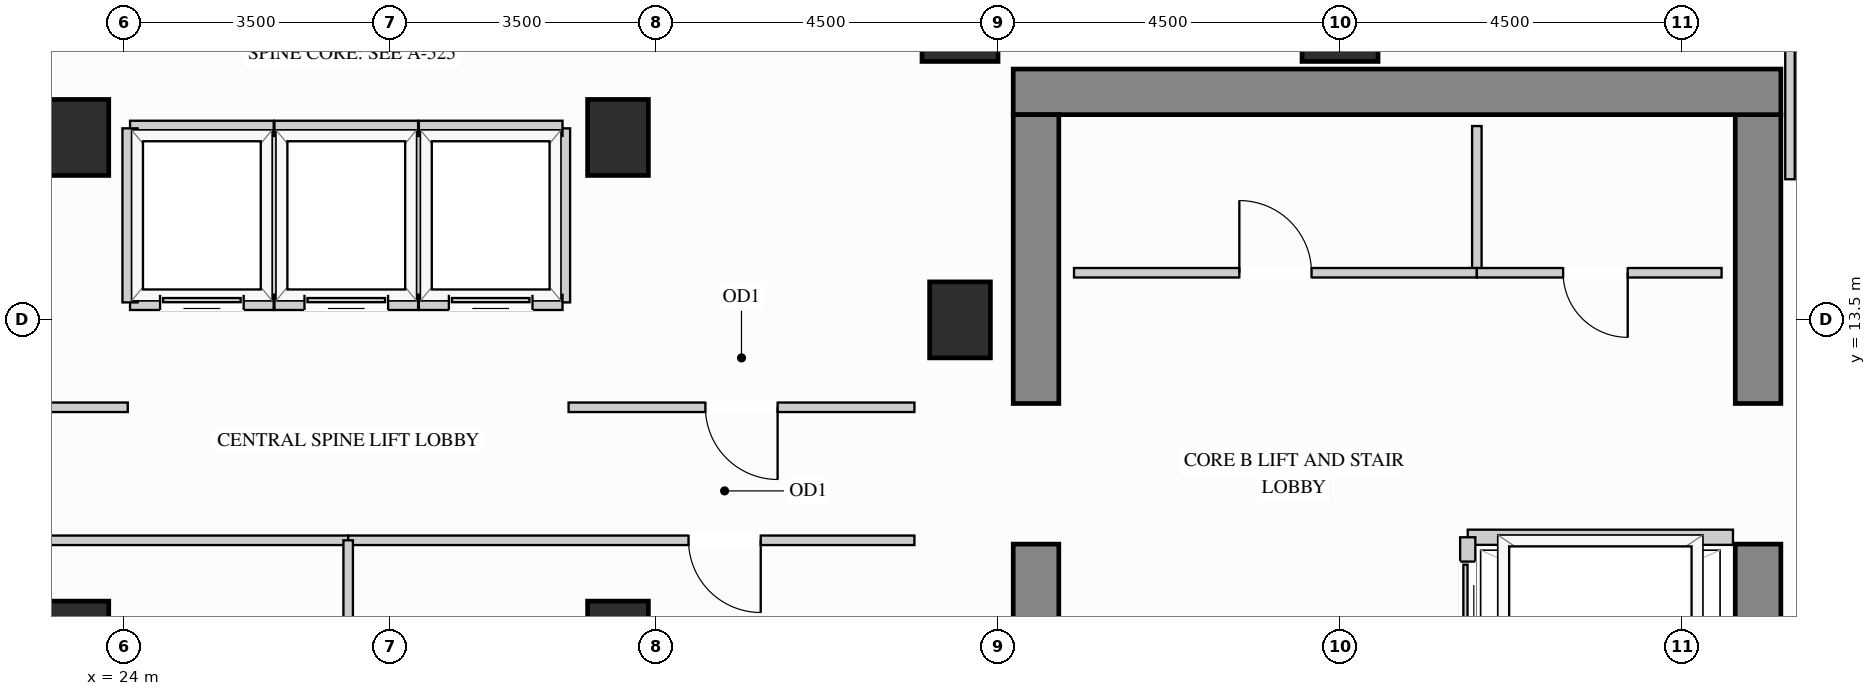
"""IFC4 building model, lengths in metres.
Left out: names, types, materials, properties, quantities, classifications, styles, units other than length and angle.
Written with IfcOpenShell. Run it as: python <this file> out.ifc"""

import sys

from ifc_helpers import new_model, si_unit, direction, frame, frame_2d, origin, origin_2d, place, context, subcontext, project, spatial, rectangle, extrude, source, transform, mapped, element, fill, save


model = new_model("IFC4")
c1 = context("Model", 3, precision=1e-05, world=origin(), true_north=direction((0.0, 1.0)))
c2 = subcontext(c1, "Body", "Model", "MODEL_VIEW")
j1 = project(units=[si_unit("LENGTHUNIT", "METRE"), si_unit("PLANEANGLEUNIT", "RADIAN")], contexts=[c1])
p1 = place(None, origin())
s1 = spatial("IfcSite", under=j1, at=p1, CompositionType="ELEMENT")
p2 = place(p1, origin())
s2 = spatial("IfcBuilding", under=s1, at=p2, CompositionType="ELEMENT")
p3 = place(p2, frame((0.0, 0.0, 197.1)))
s3 = spatial("IfcBuildingStorey", under=s2, at=p3, CompositionType="ELEMENT", Elevation=197.1)
m1 = source(origin(), c2, "Body", "SweptSolid", [
    extrude(rectangle(XDim=0.8, YDim=1.0, at=origin_2d()), origin(), (0.0, 0.0, 1.0), 3.4),
])
for number, where, z_axis, x_axis in (
    (1, (35.0, 13.5, 0.0), (0.0, 0.0, 1.0), (1.0, 0.0, 0.0)),
    (2, (23.4, 15.9, 0.0), (0.0, 0.0, 1.0), (1.0, 0.0, 0.0)),
    (3, (23.4, 9.3, 0.0), (0.0, 0.0, 1.0), (1.0, 0.0, 0.0)),
    (4, (30.5, 15.9, 0.0), (0.0, 0.0, 1.0), (1.0, 0.0, 0.0)),
    (5, (30.5, 9.3, 0.0), (0.0, 0.0, 1.0), (1.0, 0.0, 0.0)),
):
    element("IfcColumn", number, at=place(p3, frame(where, z_axis=z_axis, x_axis=x_axis)), inside=s3, PredefinedType="COLUMN", context=c2, shape_type="MappedRepresentation", body=[
        mapped(m1, transform((0.0, 0.0, 0.0), x_axis=(1.0, 0.0, 0.0), y_axis=(0.0, 1.0, 0.0), z_axis=(0.0, 0.0, 1.0))),
    ])
m2 = source(origin(), c2, "Body", "SweptSolid", [
    extrude(rectangle(XDim=1.0, YDim=1.0, at=origin_2d()), origin(), (0.0, 0.0, 1.0), 3.4),
])
for number, where, z_axis, x_axis in (
    (6, (35.0, 17.4, 0.0), (0.0, 0.0, 1.0), (1.0, 0.0, 0.0)),
    (7, (40.0, 17.4, 0.0), (0.0, 0.0, 1.0), (1.0, 0.0, 0.0)),
):
    element("IfcColumn", number, at=place(p3, frame(where, z_axis=z_axis, x_axis=x_axis)), inside=s3, PredefinedType="COLUMN", context=c2, shape_type="MappedRepresentation", body=[
        mapped(m2, transform((0.0, 0.0, 0.0), x_axis=(1.0, 0.0, 0.0), y_axis=(0.0, 1.0, 0.0), z_axis=(0.0, 0.0, 1.0))),
    ])
m3 = source(origin(), c2, "Body", "SweptSolid", [
    extrude(rectangle(XDim=5.75, YDim=0.6, at=frame_2d((2.875, 0.0))), origin(), (0.0, 0.0, 1.0), 3.4),
])
p4 = place(p3, frame((45.5, 4.8, 0.0), z_axis=(0.0, 0.0, 1.0), x_axis=(0.0, 1.0, 0.0)))
e8 = element("IfcWall", 8, at=p4, inside=s3, PredefinedType="SHEAR", context=c2, shape_type="MappedRepresentation", body=[
    mapped(m3, transform((0.0, 0.0, 0.0), x_axis=(1.0, 0.0, 0.0), y_axis=(0.0, 1.0, 0.0), z_axis=(0.0, 0.0, 1.0))),
])
m4 = source(origin(), c2, "Body", "SweptSolid", [
    extrude(rectangle(XDim=3.8, YDim=0.6, at=frame_2d((1.9, 0.0))), origin(), (0.0, 0.0, 1.0), 3.4),
])
p5 = place(p3, frame((45.5, 12.4, 0.0), z_axis=(0.0, 0.0, 1.0), x_axis=(0.0, 1.0, 0.0)))
e9 = element("IfcWall", 9, at=p5, inside=s3, PredefinedType="SHEAR", context=c2, shape_type="MappedRepresentation", body=[
    mapped(m4, transform((0.0, 0.0, 0.0), x_axis=(1.0, 0.0, 0.0), y_axis=(0.0, 1.0, 0.0), z_axis=(0.0, 0.0, 1.0))),
])
m5 = source(origin(), c2, "Body", "SweptSolid", [
    extrude(rectangle(XDim=10.1, YDim=0.6, at=frame_2d((5.05, 0.0))), origin(), (0.0, 0.0, 1.0), 3.4),
])
p6 = place(p3, frame((35.7, 16.5, 0.0), z_axis=(0.0, 0.0, 1.0), x_axis=(1.0, 0.0, 0.0)))
e10 = element("IfcWall", 10, at=p6, inside=s3, PredefinedType="SHEAR", context=c2, shape_type="MappedRepresentation", body=[
    mapped(m5, transform((0.0, 0.0, 0.0), x_axis=(1.0, 0.0, 0.0), y_axis=(0.0, 1.0, 0.0), z_axis=(0.0, 0.0, 1.0))),
])
p7 = place(p3, frame((36.0, 4.8, 0.0), z_axis=(0.0, 0.0, 1.0), x_axis=(0.0, 1.0, 0.0)))
e11 = element("IfcWall", 11, at=p7, inside=s3, PredefinedType="SHEAR", context=c2, shape_type="MappedRepresentation", body=[
    mapped(m3, transform((0.0, 0.0, 0.0), x_axis=(1.0, 0.0, 0.0), y_axis=(0.0, 1.0, 0.0), z_axis=(0.0, 0.0, 1.0))),
])
p8 = place(p3, frame((36.0, 12.4, 0.0), z_axis=(0.0, 0.0, 1.0), x_axis=(0.0, 1.0, 0.0)))
e12 = element("IfcWall", 12, at=p8, inside=s3, PredefinedType="SHEAR", context=c2, shape_type="MappedRepresentation", body=[
    mapped(m4, transform((0.0, 0.0, 0.0), x_axis=(1.0, 0.0, 0.0), y_axis=(0.0, 1.0, 0.0), z_axis=(0.0, 0.0, 1.0))),
])
m6 = source(origin(), c2, "Body", "SweptSolid", [
    extrude(rectangle(XDim=1.93, YDim=0.125, at=frame_2d((0.965, 0.0))), origin(), (0.0, 0.0, 1.0), 3.385),
])
p9 = place(p3, frame((41.8, 14.12, 0.0), z_axis=(0.0, 0.0, 1.0), x_axis=(0.0, 1.0, 0.0)))
e13 = element("IfcWall", 13, at=p9, inside=s3, PredefinedType="PARTITIONING", context=c2, shape_type="MappedRepresentation", body=[
    mapped(m6, transform((0.0, 0.0, 0.0), x_axis=(1.0, 0.0, 0.0), y_axis=(0.0, 1.0, 0.0), z_axis=(0.0, 0.0, 1.0))),
])
p10 = place(p3, frame((36.5, 14.12, 0.0), z_axis=(0.0, 0.0, 1.0), x_axis=(1.0, 0.0, 0.0)))
e14 = element("IfcWall", 14, at=p10, inside=s3, PredefinedType="PARTITIONING", context=c2, shape_type="SweptSolid", body=[
    extrude(rectangle(XDim=5.3, YDim=0.125, at=frame_2d((2.65, 0.0))), origin(), (0.0, 0.0, 1.0), 3.385),
])
p11 = place(p10, frame((2.175, 0.0, 0.0)))
e15 = element("IfcOpeningElement", 15, at=p11, cuts=e14, PredefinedType="OPENING", context=c2, shape_type="SweptSolid", body=[
    extrude(rectangle(XDim=0.95, YDim=2.15, at=frame_2d((0.475, 1.075))), frame((0.0, 0.073, 0.0), z_axis=(0.0, -1.0, 0.0), x_axis=(1.0, 0.0, 0.0)), (0.0, 0.0, 1.0), 0.145),
])
p12 = place(p3, frame((41.8, 14.12, 0.0), z_axis=(0.0, 0.0, 1.0), x_axis=(1.0, 0.0, 0.0)))
e16 = element("IfcWall", 16, at=p12, inside=s3, PredefinedType="PARTITIONING", context=c2, shape_type="SweptSolid", body=[
    extrude(rectangle(XDim=3.22, YDim=0.125, at=frame_2d((1.61, 0.0))), origin(), (0.0, 0.0, 1.0), 3.385),
])
p13 = place(p12, frame((1.135, 0.0, 0.0)))
e17 = element("IfcOpeningElement", 17, at=p13, cuts=e16, PredefinedType="OPENING", context=c2, shape_type="SweptSolid", body=[
    extrude(rectangle(XDim=0.85, YDim=2.1, at=frame_2d((0.425, 1.05))), frame((0.0, 0.073, 0.0), z_axis=(0.0, -1.0, 0.0), x_axis=(1.0, 0.0, 0.0)), (0.0, 0.0, 1.0), 0.145),
])
m7 = source(origin(), c2, "Body", "SweptSolid", [
    extrude(rectangle(XDim=2.298, YDim=0.125, at=frame_2d((1.149, 0.0))), origin(), (0.0, 0.0, 1.0), 3.385),
])
p14 = place(p3, frame((45.92, 15.35, 0.0), z_axis=(0.0, 0.0, 1.0), x_axis=(0.0, 1.0, 0.0)))
e18 = element("IfcWall", 18, at=p14, inside=s3, PredefinedType="PARTITIONING", context=c2, shape_type="MappedRepresentation", body=[
    mapped(m7, transform((0.0, 0.0, 0.0), x_axis=(1.0, 0.0, 0.0), y_axis=(0.0, 1.0, 0.0), z_axis=(0.0, 0.0, 1.0))),
])
p15 = place(p3, frame((29.85, 12.35, 0.0), z_axis=(0.0, 0.0, 1.0), x_axis=(1.0, 0.0, 0.0)))
e19 = element("IfcWall", 19, at=p15, inside=s3, PredefinedType="PARTITIONING", context=c2, shape_type="SweptSolid", body=[
    extrude(rectangle(XDim=4.55, YDim=0.125, at=frame_2d((2.275, 0.0))), origin(), (0.0, 0.0, 1.0), 3.385),
])
p16 = place(p15, frame((1.8, 0.0, 0.0)))
e20 = element("IfcOpeningElement", 20, at=p16, cuts=e19, PredefinedType="OPENING", context=c2, shape_type="SweptSolid", body=[
    extrude(rectangle(XDim=0.95, YDim=2.15, at=frame_2d((0.475, 1.075))), frame((0.0, 0.073, 0.0), z_axis=(0.0, -1.0, 0.0), x_axis=(1.0, 0.0, 0.0)), (0.0, 0.0, 1.0), 0.145),
])
p17 = place(p3, frame((19.5, 12.35, 0.0), z_axis=(0.0, 0.0, 1.0), x_axis=(1.0, 0.0, 0.0)))
e21 = element("IfcWall", 21, at=p17, inside=s3, PredefinedType="PARTITIONING", context=c2, shape_type="SweptSolid", body=[
    extrude(rectangle(XDim=4.55, YDim=0.125, at=frame_2d((2.275, 0.0))), origin(), (0.0, 0.0, 1.0), 3.385),
])
p18 = place(p17, frame((1.8, 0.0, 0.0)))
e22 = element("IfcOpeningElement", 22, at=p18, cuts=e21, PredefinedType="OPENING", context=c2, shape_type="SweptSolid", body=[
    extrude(rectangle(XDim=0.95, YDim=2.15, at=frame_2d((0.475, 1.075))), frame((0.0, 0.073, 0.0), z_axis=(0.0, -1.0, 0.0), x_axis=(1.0, 0.0, 0.0)), (0.0, 0.0, 1.0), 0.145),
])
p19 = place(p3, frame((19.5, 10.6, 0.0), z_axis=(0.0, 0.0, 1.0), x_axis=(1.0, 0.0, 0.0)))
e23 = element("IfcWall", 23, at=p19, inside=s3, PredefinedType="PARTITIONING", context=c2, shape_type="SweptSolid", body=[
    extrude(rectangle(XDim=7.45, YDim=0.125, at=frame_2d((3.725, 0.0))), origin(), (0.0, 0.0, 1.0), 3.385),
])
p20 = place(p19, frame((2.022, 0.0, 0.0)))
e24 = element("IfcOpeningElement", 24, at=p20, cuts=e23, PredefinedType="OPENING", context=c2, shape_type="SweptSolid", body=[
    extrude(rectangle(XDim=0.95, YDim=2.15, at=frame_2d((0.475, 1.075))), frame((0.0, 0.073, 0.0), z_axis=(0.0, -1.0, 0.0), x_axis=(1.0, 0.0, 0.0)), (0.0, 0.0, 1.0), 0.145),
])
p21 = place(p3, frame((26.95, 10.6, 0.0), z_axis=(0.0, 0.0, 1.0), x_axis=(1.0, 0.0, 0.0)))
e25 = element("IfcWall", 25, at=p21, inside=s3, PredefinedType="PARTITIONING", context=c2, shape_type="SweptSolid", body=[
    extrude(rectangle(XDim=7.45, YDim=0.125, at=frame_2d((3.725, 0.0))), origin(), (0.0, 0.0, 1.0), 3.385),
])
p22 = place(p21, frame((4.478, 0.0, 0.0)))
e26 = element("IfcOpeningElement", 26, at=p22, cuts=e25, PredefinedType="OPENING", context=c2, shape_type="SweptSolid", body=[
    extrude(rectangle(XDim=0.95, YDim=2.15, at=frame_2d((0.475, 1.075))), frame((0.0, 0.073, 0.0), z_axis=(0.0, -1.0, 0.0), x_axis=(1.0, 0.0, 0.0)), (0.0, 0.0, 1.0), 0.145),
])
m8 = source(origin(), c2, "Body", "SweptSolid", [
    extrude(rectangle(XDim=1.748, YDim=0.125, at=frame_2d((0.874, 0.0))), origin(), (0.0, 0.0, 1.0), 3.385),
])
p23 = place(p3, frame((26.95, 8.852, 0.0), z_axis=(0.0, 0.0, 1.0), x_axis=(0.0, 1.0, 0.0)))
e27 = element("IfcWall", 27, at=p23, inside=s3, PredefinedType="PARTITIONING", context=c2, shape_type="MappedRepresentation", body=[
    mapped(m8, transform((0.0, 0.0, 0.0), x_axis=(1.0, 0.0, 0.0), y_axis=(0.0, 1.0, 0.0), z_axis=(0.0, 0.0, 1.0))),
])
m9 = source(origin(), c2, "Body", "SweptSolid", [
    extrude(rectangle(XDim=2.29, YDim=0.2, at=frame_2d((1.145, 0.0))), origin(), (0.0, 0.0, 1.0), 3.385),
])
p24 = place(p3, frame((25.97, 13.73, 0.0), z_axis=(0.0, 0.0, 1.0), x_axis=(0.0, 1.0, 0.0)))
e28 = element("IfcWall", 28, at=p24, inside=s3, PredefinedType="PARTITIONING", context=c2, shape_type="MappedRepresentation", body=[
    mapped(m9, transform((0.0, 0.0, 0.0), x_axis=(1.0, 0.0, 0.0), y_axis=(0.0, 1.0, 0.0), z_axis=(0.0, 0.0, 1.0))),
])
m10 = source(origin(), c2, "Body", "SweptSolid", [
    extrude(rectangle(XDim=1.89, YDim=0.2, at=frame_2d((0.945, 0.0))), origin(), (0.0, 0.0, 1.0), 2.773),
])
p25 = place(p3, frame((24.08, 16.02, 0.0), z_axis=(0.0, 0.0, 1.0), x_axis=(1.0, 0.0, 0.0)))
e29 = element("IfcWall", 29, at=p25, inside=s3, PredefinedType="PARTITIONING", context=c2, shape_type="MappedRepresentation", body=[
    mapped(m10, transform((0.0, 0.0, 0.0), x_axis=(1.0, 0.0, 0.0), y_axis=(0.0, 1.0, 0.0), z_axis=(0.0, 0.0, 1.0))),
])
p26 = place(p3, frame((24.08, 13.73, 0.0), z_axis=(0.0, 0.0, 1.0), x_axis=(1.0, 0.0, 0.0)))
e30 = element("IfcWall", 30, at=p26, inside=s3, PredefinedType="PARTITIONING", context=c2, shape_type="SweptSolid", body=[
    extrude(rectangle(XDim=1.89, YDim=0.2, at=frame_2d((0.945, 0.0))), origin(), (0.0, 0.0, 1.0), 2.466),
])
p27 = place(p26, frame((0.395, 0.0, 0.0)))
e31 = element("IfcOpeningElement", 31, at=p27, cuts=e30, PredefinedType="OPENING", context=c2, shape_type="SweptSolid", body=[
    extrude(rectangle(XDim=1.1, YDim=2.2, at=frame_2d((0.55, 1.1))), frame((0.0, 0.11, 0.0), z_axis=(0.0, -1.0, 0.0), x_axis=(1.0, 0.0, 0.0)), (0.0, 0.0, 1.0), 0.22),
])
for number, where, z_axis, x_axis in (
    (32, (24.08, 13.73, 0.0), (0.0, 0.0, 1.0), (0.0, 1.0, 0.0)),
    (33, (27.87, 13.73, 0.0), (0.0, 0.0, 1.0), (0.0, 1.0, 0.0)),
):
    element("IfcWall", number, at=place(p3, frame(where, z_axis=z_axis, x_axis=x_axis)), inside=s3, PredefinedType="PARTITIONING", context=c2, shape_type="MappedRepresentation", body=[
        mapped(m9, transform((0.0, 0.0, 0.0), x_axis=(1.0, 0.0, 0.0), y_axis=(0.0, 1.0, 0.0), z_axis=(0.0, 0.0, 1.0))),
    ])
m11 = source(origin(), c2, "Body", "SweptSolid", [
    extrude(rectangle(XDim=1.89, YDim=0.2, at=frame_2d((0.945, 0.0))), origin(), (0.0, 0.0, 1.0), 2.773),
])
p28 = place(p3, frame((25.98, 16.02, 0.0), z_axis=(0.0, 0.0, 1.0), x_axis=(1.0, 0.0, 0.0)))
e34 = element("IfcWall", 34, at=p28, inside=s3, PredefinedType="PARTITIONING", context=c2, shape_type="MappedRepresentation", body=[
    mapped(m11, transform((0.0, 0.0, 0.0), x_axis=(1.0, 0.0, 0.0), y_axis=(0.0, 1.0, 0.0), z_axis=(0.0, 0.0, 1.0))),
])
p29 = place(p3, frame((25.98, 13.73, 0.0), z_axis=(0.0, 0.0, 1.0), x_axis=(1.0, 0.0, 0.0)))
e35 = element("IfcWall", 35, at=p29, inside=s3, PredefinedType="PARTITIONING", context=c2, shape_type="SweptSolid", body=[
    extrude(rectangle(XDim=1.89, YDim=0.2, at=frame_2d((0.945, 0.0))), origin(), (0.0, 0.0, 1.0), 2.466),
])
p30 = place(p29, frame((0.395, 0.0, 0.0)))
e36 = element("IfcOpeningElement", 36, at=p30, cuts=e35, PredefinedType="OPENING", context=c2, shape_type="SweptSolid", body=[
    extrude(rectangle(XDim=1.1, YDim=2.2, at=frame_2d((0.55, 1.1))), frame((0.0, 0.11, 0.0), z_axis=(0.0, -1.0, 0.0), x_axis=(1.0, 0.0, 0.0)), (0.0, 0.0, 1.0), 0.22),
])
p31 = place(p3, frame((29.77, 13.73, 0.0), z_axis=(0.0, 0.0, 1.0), x_axis=(0.0, 1.0, 0.0)))
e37 = element("IfcWall", 37, at=p31, inside=s3, PredefinedType="PARTITIONING", context=c2, shape_type="MappedRepresentation", body=[
    mapped(m9, transform((0.0, 0.0, 0.0), x_axis=(1.0, 0.0, 0.0), y_axis=(0.0, 1.0, 0.0), z_axis=(0.0, 0.0, 1.0))),
])
p32 = place(p3, frame((27.88, 16.02, 0.0), z_axis=(0.0, 0.0, 1.0), x_axis=(1.0, 0.0, 0.0)))
e38 = element("IfcWall", 38, at=p32, inside=s3, PredefinedType="PARTITIONING", context=c2, shape_type="MappedRepresentation", body=[
    mapped(m11, transform((0.0, 0.0, 0.0), x_axis=(1.0, 0.0, 0.0), y_axis=(0.0, 1.0, 0.0), z_axis=(0.0, 0.0, 1.0))),
])
p33 = place(p3, frame((27.88, 13.73, 0.0), z_axis=(0.0, 0.0, 1.0), x_axis=(1.0, 0.0, 0.0)))
e39 = element("IfcWall", 39, at=p33, inside=s3, PredefinedType="PARTITIONING", context=c2, shape_type="SweptSolid", body=[
    extrude(rectangle(XDim=1.89, YDim=0.2, at=frame_2d((0.945, 0.0))), origin(), (0.0, 0.0, 1.0), 2.466),
])
p34 = place(p33, frame((0.395, 0.0, 0.0)))
e40 = element("IfcOpeningElement", 40, at=p34, cuts=e39, PredefinedType="OPENING", context=c2, shape_type="SweptSolid", body=[
    extrude(rectangle(XDim=1.1, YDim=2.2, at=frame_2d((0.55, 1.1))), frame((0.0, 0.11, 0.0), z_axis=(0.0, -1.0, 0.0), x_axis=(1.0, 0.0, 0.0)), (0.0, 0.0, 1.0), 0.22),
])
m12 = source(origin(), c2, "Body", "SweptSolid", [
    extrude(rectangle(XDim=3.49, YDim=0.2, at=frame_2d((1.745, 0.0))), origin(), (0.0, 0.0, 1.0), 3.385),
])
p35 = place(p3, frame((41.68, 10.64, 0.0), z_axis=(0.0, 0.0, 1.0), x_axis=(1.0, 0.0, 0.0)))
e41 = element("IfcWall", 41, at=p35, inside=s3, PredefinedType="PARTITIONING", context=c2, shape_type="MappedRepresentation", body=[
    mapped(m12, transform((0.0, 0.0, 0.0), x_axis=(1.0, 0.0, 0.0), y_axis=(0.0, 1.0, 0.0), z_axis=(0.0, 0.0, 1.0))),
])
p36 = place(p3, frame((41.68, 8.9, 0.0), z_axis=(0.0, 0.0, 1.0), x_axis=(0.0, 1.0, 0.0)))
e42 = element("IfcWall", 42, at=p36, inside=s3, PredefinedType="PARTITIONING", context=c2, shape_type="SweptSolid", body=[
    extrude(rectangle(XDim=1.74, YDim=0.2, at=frame_2d((0.87, 0.0))), origin(), (0.0, 0.0, 1.0), 3.385),
])
p37 = place(p36, frame((0.32, 0.0, 0.0)))
e43 = element("IfcOpeningElement", 43, at=p37, cuts=e42, PredefinedType="OPENING", context=c2, shape_type="SweptSolid", body=[
    extrude(rectangle(XDim=1.1, YDim=2.2, at=frame_2d((0.55, 1.1))), frame((0.0, 0.11, 0.0), z_axis=(0.0, -1.0, 0.0), x_axis=(1.0, 0.0, 0.0)), (0.0, 0.0, 1.0), 0.22),
])
m13 = source(origin(), c2, "Body", "SweptSolid", [
    extrude(rectangle(XDim=1.1, YDim=2.2, at=frame_2d((0.55, 1.1))), frame((0.0, 0.025, 0.0), z_axis=(0.0, -1.0, 0.0), x_axis=(1.0, 0.0, 0.0)), (0.0, 0.0, 1.0), 0.05),
])
p38 = place(p27, origin())
e44 = element("IfcDoor", 44, at=p38, inside=s3, OperationType="SLIDING_TO_LEFT", PredefinedType="DOOR", context=c2, shape_type="MappedRepresentation", body=[
    mapped(m13, transform((0.0, 0.0, 0.0), x_axis=(1.0, 0.0, 0.0), y_axis=(0.0, 1.0, 0.0), z_axis=(0.0, 0.0, 1.0))),
])
fill(e31, e44)
p39 = place(p30, origin())
e45 = element("IfcDoor", 45, at=p39, inside=s3, OperationType="SLIDING_TO_LEFT", PredefinedType="DOOR", context=c2, shape_type="MappedRepresentation", body=[
    mapped(m13, transform((0.0, 0.0, 0.0), x_axis=(1.0, 0.0, 0.0), y_axis=(0.0, 1.0, 0.0), z_axis=(0.0, 0.0, 1.0))),
])
fill(e36, e45)
p40 = place(p34, origin())
e46 = element("IfcDoor", 46, at=p40, inside=s3, OperationType="SLIDING_TO_LEFT", PredefinedType="DOOR", context=c2, shape_type="MappedRepresentation", body=[
    mapped(m13, transform((0.0, 0.0, 0.0), x_axis=(1.0, 0.0, 0.0), y_axis=(0.0, 1.0, 0.0), z_axis=(0.0, 0.0, 1.0))),
])
fill(e40, e46)
p41 = place(p37, origin())
e47 = element("IfcDoor", 47, at=p41, inside=s3, OperationType="SLIDING_TO_LEFT", PredefinedType="DOOR", context=c2, shape_type="MappedRepresentation", body=[
    mapped(m13, transform((0.0, 0.0, 0.0), x_axis=(1.0, 0.0, 0.0), y_axis=(0.0, 1.0, 0.0), z_axis=(0.0, 0.0, 1.0))),
])
fill(e43, e47)
m14 = source(origin(), c2, "Body", "SweptSolid", [
    extrude(rectangle(XDim=0.95, YDim=2.15, at=frame_2d((0.475, 1.075))), frame((0.0, 0.025, 0.0), z_axis=(0.0, -1.0, 0.0), x_axis=(1.0, 0.0, 0.0)), (0.0, 0.0, 1.0), 0.05),
])
p42 = place(p11, origin())
e48 = element("IfcDoor", 48, at=p42, inside=s3, OperationType="SINGLE_SWING_LEFT", PredefinedType="DOOR", context=c2, shape_type="MappedRepresentation", body=[
    mapped(m14, transform((0.0, 0.0, 0.0), x_axis=(1.0, 0.0, 0.0), y_axis=(0.0, 1.0, 0.0), z_axis=(0.0, 0.0, 1.0))),
])
fill(e15, e48)
p43 = place(p16, origin())
e49 = element("IfcDoor", 49, at=p43, inside=s3, OperationType="SINGLE_SWING_RIGHT", PredefinedType="DOOR", context=c2, shape_type="MappedRepresentation", body=[
    mapped(m14, transform((0.0, 0.0, 0.0), x_axis=(1.0, 0.0, 0.0), y_axis=(0.0, 1.0, 0.0), z_axis=(0.0, 0.0, 1.0))),
])
fill(e20, e49)
p44 = place(p22, origin())
e50 = element("IfcDoor", 50, at=p44, inside=s3, OperationType="SINGLE_SWING_RIGHT", PredefinedType="DOOR", context=c2, shape_type="MappedRepresentation", body=[
    mapped(m14, transform((0.0, 0.0, 0.0), x_axis=(1.0, 0.0, 0.0), y_axis=(0.0, 1.0, 0.0), z_axis=(0.0, 0.0, 1.0))),
])
fill(e26, e50)
m15 = source(origin(), c2, "Body", "SweptSolid", [
    extrude(rectangle(XDim=0.85, YDim=2.1, at=frame_2d((0.425, 1.05))), frame((0.0, 0.025, 0.0), z_axis=(0.0, -1.0, 0.0), x_axis=(1.0, 0.0, 0.0)), (0.0, 0.0, 1.0), 0.05),
])
p45 = place(p13, origin())
e51 = element("IfcDoor", 51, at=p45, inside=s3, OperationType="SINGLE_SWING_RIGHT", PredefinedType="DOOR", context=c2, shape_type="MappedRepresentation", body=[
    mapped(m15, transform((0.0, 0.0, 0.0), x_axis=(1.0, 0.0, 0.0), y_axis=(0.0, 1.0, 0.0), z_axis=(0.0, 0.0, 1.0))),
])
fill(e17, e51)
save(model, sys.argv[1])
